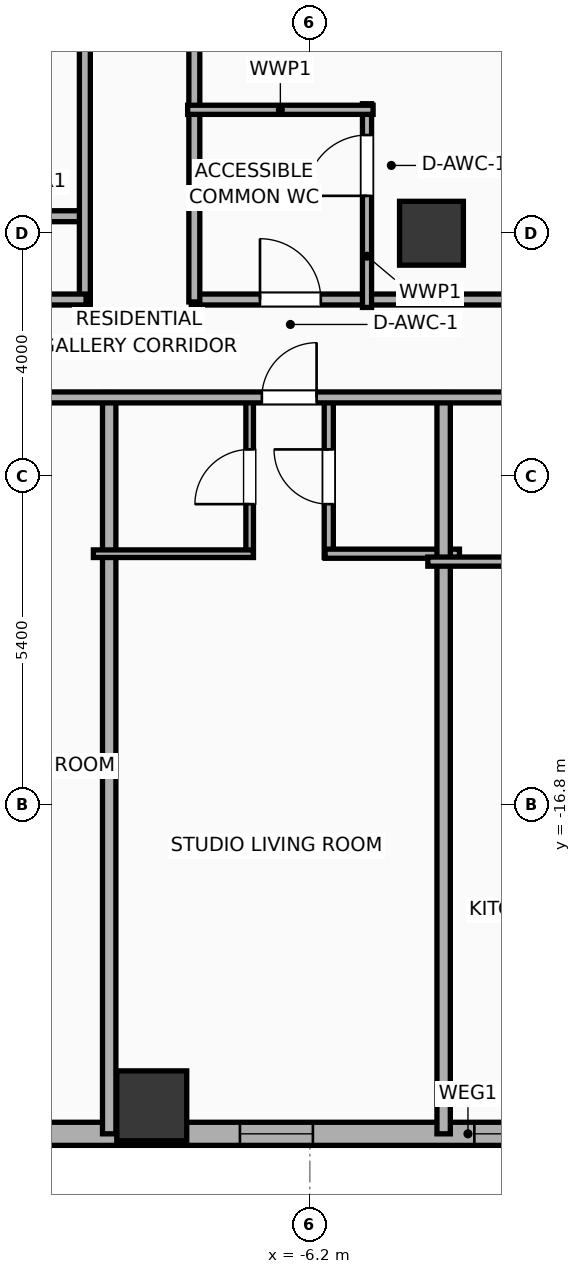
"""IFC4 building model, lengths in metres.
Left out: names, types, materials, properties, quantities, classifications, styles, units other than length and angle.
Written with IfcOpenShell. Run it as: python <this file> out.ifc"""

import sys

from ifc_helpers import new_model, si_unit, direction, frame, frame_2d, origin, origin_2d, place, context, subcontext, project, spatial, rectangle, hollow_rectangle, extrude, element, fill, save


model = new_model("IFC4")
c1 = context("Model", 3, precision=1e-05, world=origin(), true_north=direction((0.0, 1.0)))
c2 = subcontext(c1, "Body", "Model", "MODEL_VIEW")
j1 = project(units=[si_unit("LENGTHUNIT", "METRE"), si_unit("PLANEANGLEUNIT", "RADIAN")], contexts=[c1])
p1 = place(None, origin())
s1 = spatial("IfcSite", under=j1, at=p1, CompositionType="ELEMENT")
p2 = place(p1, origin())
s2 = spatial("IfcBuilding", under=s1, at=p2, CompositionType="ELEMENT")
p3 = place(p2, frame((0.0, 0.0, 33.8)))
s3 = spatial("IfcBuildingStorey", under=s2, at=p3, CompositionType="ELEMENT", Elevation=33.8)
p4 = place(p3, frame((-4.2, -7.4, 0.0), z_axis=(0.0, 0.0, 1.0), x_axis=(1.0, 0.0, 0.0)))
e1 = element("IfcColumn", 1, at=p4, inside=s3, PredefinedType="COLUMN", context=c2, shape_type="SweptSolid", body=[
    extrude(rectangle(XDim=1.05, YDim=1.05, at=origin_2d()), origin(), (0.0, 0.0, 1.0), 3.9),
])
p5 = place(p3, frame((-8.8, -21.75, 0.0), z_axis=(0.0, 0.0, 1.0), x_axis=(1.0, 0.0, 0.0)))
e2 = element("IfcColumn", 2, at=p5, inside=s3, PredefinedType="COLUMN", context=c2, shape_type="SweptSolid", body=[
    extrude(hollow_rectangle(XDim=1.15, YDim=1.15, WallThickness=0.04, at=origin_2d()), origin(), (0.0, 0.0, 1.0), 3.9),
])
p6 = place(p3, frame((22.381, -22.21, 0.0), z_axis=(0.0, 0.0, 1.0), x_axis=(-1.0, 0.0, 0.0)))
e3 = element("IfcWall", 3, at=p6, inside=s3, PredefinedType="ELEMENTEDWALL", context=c2, shape_type="SweptSolid", body=[
    extrude(rectangle(XDim=51.963, YDim=0.38, at=frame_2d((25.981, 0.0))), origin(), (0.0, 0.0, 1.0), 3.65),
])
p7 = place(p6, frame((49.127, 0.0, 0.75)))
e4 = element("IfcOpeningElement", 4, at=p7, cuts=e3, PredefinedType="OPENING", context=c2, shape_type="SweptSolid", body=[
    extrude(rectangle(XDim=1.2, YDim=2.05, at=frame_2d((0.6, 1.025))), frame((0.0, 0.2, 0.0), z_axis=(0.0, -1.0, 0.0), x_axis=(1.0, 0.0, 0.0)), (0.0, 0.0, 1.0), 0.4),
])
p8 = place(p6, frame((43.926, 0.0, 0.75)))
e5 = element("IfcOpeningElement", 5, at=p8, cuts=e3, PredefinedType="OPENING", context=c2, shape_type="SweptSolid", body=[
    extrude(rectangle(XDim=1.2, YDim=2.05, at=frame_2d((0.6, 1.025))), frame((0.0, 0.2, 0.0), z_axis=(0.0, -1.0, 0.0), x_axis=(1.0, 0.0, 0.0)), (0.0, 0.0, 1.0), 0.4),
])
p9 = place(p6, frame((46.676, 0.0, 0.75)))
e6 = element("IfcOpeningElement", 6, at=p9, cuts=e3, PredefinedType="OPENING", context=c2, shape_type="SweptSolid", body=[
    extrude(rectangle(XDim=1.2, YDim=2.05, at=frame_2d((0.6, 1.025))), frame((0.0, 0.2, 0.0), z_axis=(0.0, -1.0, 0.0), x_axis=(1.0, 0.0, 0.0)), (0.0, 0.0, 1.0), 0.4),
])
p10 = place(p6, frame((39.531, 0.0, 0.75)))
e7 = element("IfcOpeningElement", 7, at=p10, cuts=e3, PredefinedType="OPENING", context=c2, shape_type="SweptSolid", body=[
    extrude(rectangle(XDim=1.2, YDim=2.05, at=frame_2d((0.6, 1.025))), frame((0.0, 0.2, 0.0), z_axis=(0.0, -1.0, 0.0), x_axis=(1.0, 0.0, 0.0)), (0.0, 0.0, 1.0), 0.4),
])
p11 = place(p6, frame((32.926, 0.0, 0.75)))
e8 = element("IfcOpeningElement", 8, at=p11, cuts=e3, PredefinedType="OPENING", context=c2, shape_type="SweptSolid", body=[
    extrude(rectangle(XDim=1.2, YDim=2.05, at=frame_2d((0.6, 1.025))), frame((0.0, 0.2, 0.0), z_axis=(0.0, -1.0, 0.0), x_axis=(1.0, 0.0, 0.0)), (0.0, 0.0, 1.0), 0.4),
])
p12 = place(p6, frame((35.676, 0.0, 0.75)))
e9 = element("IfcOpeningElement", 9, at=p12, cuts=e3, PredefinedType="OPENING", context=c2, shape_type="SweptSolid", body=[
    extrude(rectangle(XDim=1.2, YDim=2.05, at=frame_2d((0.6, 1.025))), frame((0.0, 0.2, 0.0), z_axis=(0.0, -1.0, 0.0), x_axis=(1.0, 0.0, 0.0)), (0.0, 0.0, 1.0), 0.4),
])
p13 = place(p6, frame((28.531, 0.0, 0.75)))
e10 = element("IfcOpeningElement", 10, at=p13, cuts=e3, PredefinedType="OPENING", context=c2, shape_type="SweptSolid", body=[
    extrude(rectangle(XDim=1.2, YDim=2.05, at=frame_2d((0.6, 1.025))), frame((0.0, 0.2, 0.0), z_axis=(0.0, -1.0, 0.0), x_axis=(1.0, 0.0, 0.0)), (0.0, 0.0, 1.0), 0.4),
])
p14 = place(p6, frame((21.926, 0.0, 0.75)))
e11 = element("IfcOpeningElement", 11, at=p14, cuts=e3, PredefinedType="OPENING", context=c2, shape_type="SweptSolid", body=[
    extrude(rectangle(XDim=1.2, YDim=2.05, at=frame_2d((0.6, 1.025))), frame((0.0, 0.2, 0.0), z_axis=(0.0, -1.0, 0.0), x_axis=(1.0, 0.0, 0.0)), (0.0, 0.0, 1.0), 0.4),
])
p15 = place(p6, frame((24.676, 0.0, 0.75)))
e12 = element("IfcOpeningElement", 12, at=p15, cuts=e3, PredefinedType="OPENING", context=c2, shape_type="SweptSolid", body=[
    extrude(rectangle(XDim=1.2, YDim=2.05, at=frame_2d((0.6, 1.025))), frame((0.0, 0.2, 0.0), z_axis=(0.0, -1.0, 0.0), x_axis=(1.0, 0.0, 0.0)), (0.0, 0.0, 1.0), 0.4),
])
p16 = place(p6, frame((18.636, 0.0, 0.75)))
e13 = element("IfcOpeningElement", 13, at=p16, cuts=e3, PredefinedType="OPENING", context=c2, shape_type="SweptSolid", body=[
    extrude(rectangle(XDim=1.2, YDim=2.05, at=frame_2d((0.6, 1.025))), frame((0.0, 0.2, 0.0), z_axis=(0.0, -1.0, 0.0), x_axis=(1.0, 0.0, 0.0)), (0.0, 0.0, 1.0), 0.4),
])
p17 = place(p6, frame((15.886, 0.0, 0.75)))
e14 = element("IfcOpeningElement", 14, at=p17, cuts=e3, PredefinedType="OPENING", context=c2, shape_type="SweptSolid", body=[
    extrude(rectangle(XDim=1.2, YDim=2.05, at=frame_2d((0.6, 1.025))), frame((0.0, 0.2, 0.0), z_axis=(0.0, -1.0, 0.0), x_axis=(1.0, 0.0, 0.0)), (0.0, 0.0, 1.0), 0.4),
])
p18 = place(p6, frame((12.031, 0.0, 0.75)))
e15 = element("IfcOpeningElement", 15, at=p18, cuts=e3, PredefinedType="OPENING", context=c2, shape_type="SweptSolid", body=[
    extrude(rectangle(XDim=1.2, YDim=2.05, at=frame_2d((0.6, 1.025))), frame((0.0, 0.2, 0.0), z_axis=(0.0, -1.0, 0.0), x_axis=(1.0, 0.0, 0.0)), (0.0, 0.0, 1.0), 0.4),
])
p19 = place(p6, frame((7.636, 0.0, 0.75)))
e16 = element("IfcOpeningElement", 16, at=p19, cuts=e3, PredefinedType="OPENING", context=c2, shape_type="SweptSolid", body=[
    extrude(rectangle(XDim=1.2, YDim=2.05, at=frame_2d((0.6, 1.025))), frame((0.0, 0.2, 0.0), z_axis=(0.0, -1.0, 0.0), x_axis=(1.0, 0.0, 0.0)), (0.0, 0.0, 1.0), 0.4),
])
p20 = place(p6, frame((4.886, 0.0, 0.75)))
e17 = element("IfcOpeningElement", 17, at=p20, cuts=e3, PredefinedType="OPENING", context=c2, shape_type="SweptSolid", body=[
    extrude(rectangle(XDim=1.2, YDim=2.05, at=frame_2d((0.6, 1.025))), frame((0.0, 0.2, 0.0), z_axis=(0.0, -1.0, 0.0), x_axis=(1.0, 0.0, 0.0)), (0.0, 0.0, 1.0), 0.4),
])
p21 = place(p6, frame((2.036, 0.0, 0.75)))
e18 = element("IfcOpeningElement", 18, at=p21, cuts=e3, PredefinedType="OPENING", context=c2, shape_type="SweptSolid", body=[
    extrude(rectangle(XDim=1.2, YDim=2.05, at=frame_2d((0.6, 1.025))), frame((0.0, 0.2, 0.0), z_axis=(0.0, -1.0, 0.0), x_axis=(1.0, 0.0, 0.0)), (0.0, 0.0, 1.0), 0.4),
])
p22 = place(p3, frame((-12.15, -7.12, 0.0), z_axis=(0.0, 0.0, 1.0), x_axis=(1.0, 0.0, 0.0)))
e19 = element("IfcWall", 19, at=p22, inside=s3, PredefinedType="PARTITIONING", context=c2, shape_type="SweptSolid", body=[
    extrude(rectangle(XDim=2.27, YDim=0.18, at=frame_2d((1.135, 0.0))), origin(), (0.0, 0.0, 1.0), 2.94),
])
p23 = place(p3, frame((-9.9, -8.58, 0.0), z_axis=(0.0, 0.0, 1.0), x_axis=(0.0, 1.0, 0.0)))
e20 = element("IfcWall", 20, at=p23, inside=s3, PredefinedType="PARTITIONING", context=c2, shape_type="SweptSolid", body=[
    extrude(rectangle(XDim=17.16, YDim=0.18, at=frame_2d((8.58, 0.0))), origin(), (0.0, 0.0, 1.0), 3.65),
])
p24 = place(p23, frame((7.172, 0.0, 0.0)))
e21 = element("IfcOpeningElement", 21, at=p24, cuts=e20, PredefinedType="OPENING", context=c2, shape_type="SweptSolid", body=[
    extrude(rectangle(XDim=1.1, YDim=2.05, at=frame_2d((0.55, 1.025))), frame((0.0, 0.1, 0.0), z_axis=(0.0, -1.0, 0.0), x_axis=(1.0, 0.0, 0.0)), (0.0, 0.0, 1.0), 0.2),
])
p25 = place(p3, frame((-33.41, -8.49, 0.0), z_axis=(0.0, 0.0, 1.0), x_axis=(1.0, 0.0, 0.0)))
e22 = element("IfcWall", 22, at=p25, inside=s3, PredefinedType="PARTITIONING", context=c2, shape_type="SweptSolid", body=[
    extrude(rectangle(XDim=23.53, YDim=0.18, at=frame_2d((11.765, 0.0))), origin(), (0.0, 0.0, 1.0), 3.65),
])
p26 = place(p3, frame((-8.15, -8.49, 0.0), z_axis=(0.0, 0.0, 1.0), x_axis=(1.0, 0.0, 0.0)))
e23 = element("IfcWall", 23, at=p26, inside=s3, PredefinedType="PARTITIONING", context=c2, shape_type="SweptSolid", body=[
    extrude(rectangle(XDim=16.3, YDim=0.18, at=frame_2d((8.15, 0.0))), origin(), (0.0, 0.0, 1.0), 3.65),
])
p27 = place(p26, frame((1.13, 0.0, 0.0)))
e24 = element("IfcOpeningElement", 24, at=p27, cuts=e23, PredefinedType="OPENING", context=c2, shape_type="SweptSolid", body=[
    extrude(rectangle(XDim=1.0, YDim=2.05, at=frame_2d((0.5, 1.025))), frame((0.0, 0.1, 0.0), z_axis=(0.0, -1.0, 0.0), x_axis=(1.0, 0.0, 0.0)), (0.0, 0.0, 1.0), 0.2),
])
p28 = place(p26, frame((10.12, 0.0, 0.0)))
e25 = element("IfcOpeningElement", 25, at=p28, cuts=e23, PredefinedType="OPENING", context=c2, shape_type="SweptSolid", body=[
    extrude(rectangle(XDim=0.95, YDim=2.05, at=frame_2d((0.475, 1.025))), frame((0.0, 0.1, 0.0), z_axis=(0.0, -1.0, 0.0), x_axis=(1.0, 0.0, 0.0)), (0.0, 0.0, 1.0), 0.2),
])
p29 = place(p3, frame((-8.1, -8.53, 0.0), z_axis=(0.0, 0.0, 1.0), x_axis=(0.0, 1.0, 0.0)))
e26 = element("IfcWall", 26, at=p29, inside=s3, PredefinedType="PARTITIONING", context=c2, shape_type="SweptSolid", body=[
    extrude(rectangle(XDim=17.06, YDim=0.18, at=frame_2d((8.53, 0.0))), origin(), (0.0, 0.0, 1.0), 3.65),
])
p30 = place(p3, frame((-5.26, -8.62, 0.0), z_axis=(0.0, 0.0, 1.0), x_axis=(0.0, 1.0, 0.0)))
e27 = element("IfcWall", 27, at=p30, inside=s3, PredefinedType="PLUMBINGWALL", context=c2, shape_type="SweptSolid", body=[
    extrude(rectangle(XDim=3.35, YDim=0.15, at=frame_2d((1.675, 0.0))), origin(), (0.0, 0.0, 1.0), 3.65),
])
p31 = place(p30, frame((1.835, 0.0, 0.0)))
e28 = element("IfcOpeningElement", 28, at=p31, cuts=e27, PredefinedType="OPENING", context=c2, shape_type="SweptSolid", body=[
    extrude(rectangle(XDim=1.0, YDim=2.05, at=frame_2d((0.5, 1.025))), frame((0.0, 0.085, 0.0), z_axis=(0.0, -1.0, 0.0), x_axis=(1.0, 0.0, 0.0)), (0.0, 0.0, 1.0), 0.17),
])
p32 = place(p3, frame((-8.21, -5.37, 0.0), z_axis=(0.0, 0.0, 1.0), x_axis=(1.0, 0.0, 0.0)))
e29 = element("IfcWall", 29, at=p32, inside=s3, PredefinedType="PLUMBINGWALL", context=c2, shape_type="SweptSolid", body=[
    extrude(rectangle(XDim=3.05, YDim=0.15, at=frame_2d((1.525, 0.0))), origin(), (0.0, 0.0, 1.0), 3.65),
])
p33 = place(p3, frame((-9.5, -22.21, 0.0), z_axis=(0.0, 0.0, 1.0), x_axis=(0.0, 1.0, 0.0)))
e30 = element("IfcWall", 30, at=p33, inside=s3, PredefinedType="PARTITIONING", context=c2, shape_type="SweptSolid", body=[
    extrude(rectangle(XDim=12.19, YDim=0.22, at=frame_2d((6.095, 0.0))), origin(), (0.0, 0.0, 1.0), 2.94),
])
p34 = place(p3, frame((-7.19, -12.73, 0.0), z_axis=(0.0, 0.0, 1.0), x_axis=(0.0, 1.0, 0.0)))
e31 = element("IfcWall", 31, at=p34, inside=s3, PredefinedType="PARTITIONING", context=c2, shape_type="SweptSolid", body=[
    extrude(rectangle(XDim=2.65, YDim=0.125, at=frame_2d((1.325, 0.0))), origin(), (0.0, 0.0, 1.0), 3.65),
])
p35 = place(p34, frame((0.875, 0.0, 0.0)))
e32 = element("IfcOpeningElement", 32, at=p35, cuts=e31, PredefinedType="OPENING", context=c2, shape_type="SweptSolid", body=[
    extrude(rectangle(XDim=0.9, YDim=2.05, at=frame_2d((0.45, 1.025))), frame((0.0, 0.073, 0.0), z_axis=(0.0, -1.0, 0.0), x_axis=(1.0, 0.0, 0.0)), (0.0, 0.0, 1.0), 0.145),
])
p36 = place(p3, frame((-5.889, -12.73, 0.0), z_axis=(0.0, 0.0, 1.0), x_axis=(0.0, 1.0, 0.0)))
e33 = element("IfcWall", 33, at=p36, inside=s3, PredefinedType="PLUMBINGWALL", context=c2, shape_type="SweptSolid", body=[
    extrude(rectangle(XDim=2.65, YDim=0.15, at=frame_2d((1.325, 0.0))), origin(), (0.0, 0.0, 1.0), 3.65),
])
p37 = place(p36, frame((0.875, 0.0, 0.0)))
e34 = element("IfcOpeningElement", 34, at=p37, cuts=e33, PredefinedType="OPENING", context=c2, shape_type="SweptSolid", body=[
    extrude(rectangle(XDim=0.9, YDim=2.05, at=frame_2d((0.45, 1.025))), frame((0.0, 0.085, 0.0), z_axis=(0.0, -1.0, 0.0), x_axis=(1.0, 0.0, 0.0)), (0.0, 0.0, 1.0), 0.17),
])
p38 = place(p3, frame((-9.76, -12.67, 0.0), z_axis=(0.0, 0.0, 1.0), x_axis=(1.0, 0.0, 0.0)))
e35 = element("IfcWall", 35, at=p38, inside=s3, PredefinedType="PARTITIONING", context=c2, shape_type="SweptSolid", body=[
    extrude(rectangle(XDim=2.63, YDim=0.125, at=frame_2d((1.315, 0.0))), origin(), (0.0, 0.0, 1.0), 3.65),
])
p39 = place(p3, frame((-5.949, -12.67, 0.0), z_axis=(0.0, 0.0, 1.0), x_axis=(1.0, 0.0, 0.0)))
e36 = element("IfcWall", 36, at=p39, inside=s3, PredefinedType="PLUMBINGWALL", context=c2, shape_type="SweptSolid", body=[
    extrude(rectangle(XDim=2.209, YDim=0.15, at=frame_2d((1.104, 0.0))), origin(), (0.0, 0.0, 1.0), 3.65),
])
p40 = place(p3, frame((-4.0, -22.21, 0.0), z_axis=(0.0, 0.0, 1.0), x_axis=(0.0, 1.0, 0.0)))
e37 = element("IfcWall", 37, at=p40, inside=s3, PredefinedType="PARTITIONING", context=c2, shape_type="SweptSolid", body=[
    extrude(rectangle(XDim=12.19, YDim=0.22, at=frame_2d((6.095, 0.0))), origin(), (0.0, 0.0, 1.0), 3.65),
])
p41 = place(p3, frame((-4.26, -12.8, 0.0), z_axis=(0.0, 0.0, 1.0), x_axis=(1.0, 0.0, 0.0)))
e38 = element("IfcWall", 38, at=p41, inside=s3, PredefinedType="PLUMBINGWALL", context=c2, shape_type="SweptSolid", body=[
    extrude(rectangle(XDim=2.55, YDim=0.15, at=frame_2d((1.275, 0.0))), origin(), (0.0, 0.0, 1.0), 3.65),
])
p42 = place(p3, frame((-33.41, -10.1, 0.0), z_axis=(0.0, 0.0, 1.0), x_axis=(1.0, 0.0, 0.0)))
e39 = element("IfcWall", 39, at=p42, inside=s3, PredefinedType="PARTITIONING", context=c2, shape_type="SweptSolid", body=[
    extrude(rectangle(XDim=59.62, YDim=0.18, at=frame_2d((29.81, 0.0))), origin(), (0.0, 0.0, 1.0), 3.65),
])
p43 = place(p42, frame((3.259, 0.0, 0.0)))
e40 = element("IfcOpeningElement", 40, at=p43, cuts=e39, PredefinedType="OPENING", context=c2, shape_type="SweptSolid", body=[
    extrude(rectangle(XDim=1.15, YDim=2.05, at=frame_2d((0.575, 1.025))), frame((0.0, 0.1, 0.0), z_axis=(0.0, -1.0, 0.0), x_axis=(1.0, 0.0, 0.0)), (0.0, 0.0, 1.0), 0.2),
])
p44 = place(p42, frame((10.657, 0.0, 0.0)))
e41 = element("IfcOpeningElement", 41, at=p44, cuts=e39, PredefinedType="OPENING", context=c2, shape_type="SweptSolid", body=[
    extrude(rectangle(XDim=1.15, YDim=2.05, at=frame_2d((0.575, 1.025))), frame((0.0, 0.1, 0.0), z_axis=(0.0, -1.0, 0.0), x_axis=(1.0, 0.0, 0.0)), (0.0, 0.0, 1.0), 0.2),
])
p45 = place(p42, frame((15.421, 0.0, 0.0)))
e42 = element("IfcOpeningElement", 42, at=p45, cuts=e39, PredefinedType="OPENING", context=c2, shape_type="SweptSolid", body=[
    extrude(rectangle(XDim=0.9, YDim=2.05, at=frame_2d((0.45, 1.025))), frame((0.0, 0.1, 0.0), z_axis=(0.0, -1.0, 0.0), x_axis=(1.0, 0.0, 0.0)), (0.0, 0.0, 1.0), 0.2),
])
p46 = place(p42, frame((21.657, 0.0, 0.0)))
e43 = element("IfcOpeningElement", 43, at=p46, cuts=e39, PredefinedType="OPENING", context=c2, shape_type="SweptSolid", body=[
    extrude(rectangle(XDim=1.15, YDim=2.05, at=frame_2d((0.575, 1.025))), frame((0.0, 0.1, 0.0), z_axis=(0.0, -1.0, 0.0), x_axis=(1.0, 0.0, 0.0)), (0.0, 0.0, 1.0), 0.2),
])
p47 = place(p42, frame((26.421, 0.0, 0.0)))
e44 = element("IfcOpeningElement", 44, at=p47, cuts=e39, PredefinedType="OPENING", context=c2, shape_type="SweptSolid", body=[
    extrude(rectangle(XDim=0.9, YDim=2.05, at=frame_2d((0.45, 1.025))), frame((0.0, 0.1, 0.0), z_axis=(0.0, -1.0, 0.0), x_axis=(1.0, 0.0, 0.0)), (0.0, 0.0, 1.0), 0.2),
])
p48 = place(p42, frame((32.657, 0.0, 0.0)))
e45 = element("IfcOpeningElement", 45, at=p48, cuts=e39, PredefinedType="OPENING", context=c2, shape_type="SweptSolid", body=[
    extrude(rectangle(XDim=1.15, YDim=2.05, at=frame_2d((0.575, 1.025))), frame((0.0, 0.1, 0.0), z_axis=(0.0, -1.0, 0.0), x_axis=(1.0, 0.0, 0.0)), (0.0, 0.0, 1.0), 0.2),
])
p49 = place(p42, frame((36.008, 0.0, 0.0)))
e46 = element("IfcOpeningElement", 46, at=p49, cuts=e39, PredefinedType="OPENING", context=c2, shape_type="SweptSolid", body=[
    extrude(rectangle(XDim=1.15, YDim=2.05, at=frame_2d((0.575, 1.025))), frame((0.0, 0.1, 0.0), z_axis=(0.0, -1.0, 0.0), x_axis=(1.0, 0.0, 0.0)), (0.0, 0.0, 1.0), 0.2),
])
p50 = place(p42, frame((42.917, 0.0, 0.0)))
e47 = element("IfcOpeningElement", 47, at=p50, cuts=e39, PredefinedType="OPENING", context=c2, shape_type="SweptSolid", body=[
    extrude(rectangle(XDim=0.9, YDim=2.05, at=frame_2d((0.45, 1.025))), frame((0.0, 0.1, 0.0), z_axis=(0.0, -1.0, 0.0), x_axis=(1.0, 0.0, 0.0)), (0.0, 0.0, 1.0), 0.2),
])
p51 = place(p42, frame((47.008, 0.0, 0.0)))
e48 = element("IfcOpeningElement", 48, at=p51, cuts=e39, PredefinedType="OPENING", context=c2, shape_type="SweptSolid", body=[
    extrude(rectangle(XDim=1.15, YDim=2.05, at=frame_2d((0.575, 1.025))), frame((0.0, 0.1, 0.0), z_axis=(0.0, -1.0, 0.0), x_axis=(1.0, 0.0, 0.0)), (0.0, 0.0, 1.0), 0.2),
])
p52 = place(p42, frame((55.14, 0.0, 0.0)))
e49 = element("IfcOpeningElement", 49, at=p52, cuts=e39, PredefinedType="OPENING", context=c2, shape_type="SweptSolid", body=[
    extrude(rectangle(XDim=1.15, YDim=2.05, at=frame_2d((0.575, 1.025))), frame((0.0, 0.1, 0.0), z_axis=(0.0, -1.0, 0.0), x_axis=(1.0, 0.0, 0.0)), (0.0, 0.0, 1.0), 0.2),
])
p53 = place(p13, origin())
e50 = element("IfcWindow", 50, at=p53, inside=s3, PartitioningType="SINGLE_PANEL", PredefinedType="WINDOW", context=c2, shape_type="SweptSolid", body=[
    extrude(rectangle(XDim=1.2, YDim=2.05, at=frame_2d((0.6, 1.025))), frame((0.0, 0.03, 0.0), z_axis=(0.0, -1.0, 0.0), x_axis=(1.0, 0.0, 0.0)), (0.0, 0.0, 1.0), 0.06),
])
fill(e10, e50)
p54 = place(p15, origin())
e51 = element("IfcWindow", 51, at=p54, inside=s3, PartitioningType="SINGLE_PANEL", PredefinedType="WINDOW", context=c2, shape_type="SweptSolid", body=[
    extrude(rectangle(XDim=1.2, YDim=2.05, at=frame_2d((0.6, 1.025))), frame((0.0, 0.03, 0.0), z_axis=(0.0, -1.0, 0.0), x_axis=(1.0, 0.0, 0.0)), (0.0, 0.0, 1.0), 0.06),
])
fill(e12, e51)
p55 = place(p27, origin())
e52 = element("IfcDoor", 52, at=p55, inside=s3, OperationType="SINGLE_SWING_LEFT", PredefinedType="DOOR", context=c2, shape_type="SweptSolid", body=[
    extrude(rectangle(XDim=1.0, YDim=2.05, at=frame_2d((0.5, 1.025))), frame((0.0, 0.025, 0.0), z_axis=(0.0, -1.0, 0.0), x_axis=(1.0, 0.0, 0.0)), (0.0, 0.0, 1.0), 0.05),
])
fill(e24, e52)
p56 = place(p31, origin())
e53 = element("IfcDoor", 53, at=p56, inside=s3, OperationType="SINGLE_SWING_LEFT", PredefinedType="DOOR", context=c2, shape_type="SweptSolid", body=[
    extrude(rectangle(XDim=1.0, YDim=2.05, at=frame_2d((0.5, 1.025))), frame((0.0, 0.025, 0.0), z_axis=(0.0, -1.0, 0.0), x_axis=(1.0, 0.0, 0.0)), (0.0, 0.0, 1.0), 0.05),
])
fill(e28, e53)
p57 = place(p35, origin())
e54 = element("IfcDoor", 54, at=p57, inside=s3, OperationType="SINGLE_SWING_LEFT", PredefinedType="DOOR", context=c2, shape_type="SweptSolid", body=[
    extrude(rectangle(XDim=0.9, YDim=2.05, at=frame_2d((0.45, 1.025))), frame((0.0, 0.025, 0.0), z_axis=(0.0, -1.0, 0.0), x_axis=(1.0, 0.0, 0.0)), (0.0, 0.0, 1.0), 0.05),
])
fill(e32, e54)
p58 = place(p37, origin())
e55 = element("IfcDoor", 55, at=p58, inside=s3, OperationType="SINGLE_SWING_RIGHT", PredefinedType="DOOR", context=c2, shape_type="SweptSolid", body=[
    extrude(rectangle(XDim=0.9, YDim=2.05, at=frame_2d((0.45, 1.025))), frame((0.0, 0.025, 0.0), z_axis=(0.0, -1.0, 0.0), x_axis=(1.0, 0.0, 0.0)), (0.0, 0.0, 1.0), 0.05),
])
fill(e34, e55)
p59 = place(p47, origin())
e56 = element("IfcDoor", 56, at=p59, inside=s3, OperationType="SINGLE_SWING_RIGHT", PredefinedType="DOOR", context=c2, shape_type="SweptSolid", body=[
    extrude(rectangle(XDim=0.9, YDim=2.05, at=frame_2d((0.45, 1.025))), frame((0.0, 0.025, 0.0), z_axis=(0.0, -1.0, 0.0), x_axis=(1.0, 0.0, 0.0)), (0.0, 0.0, 1.0), 0.05),
])
fill(e44, e56)
save(model, sys.argv[1])
